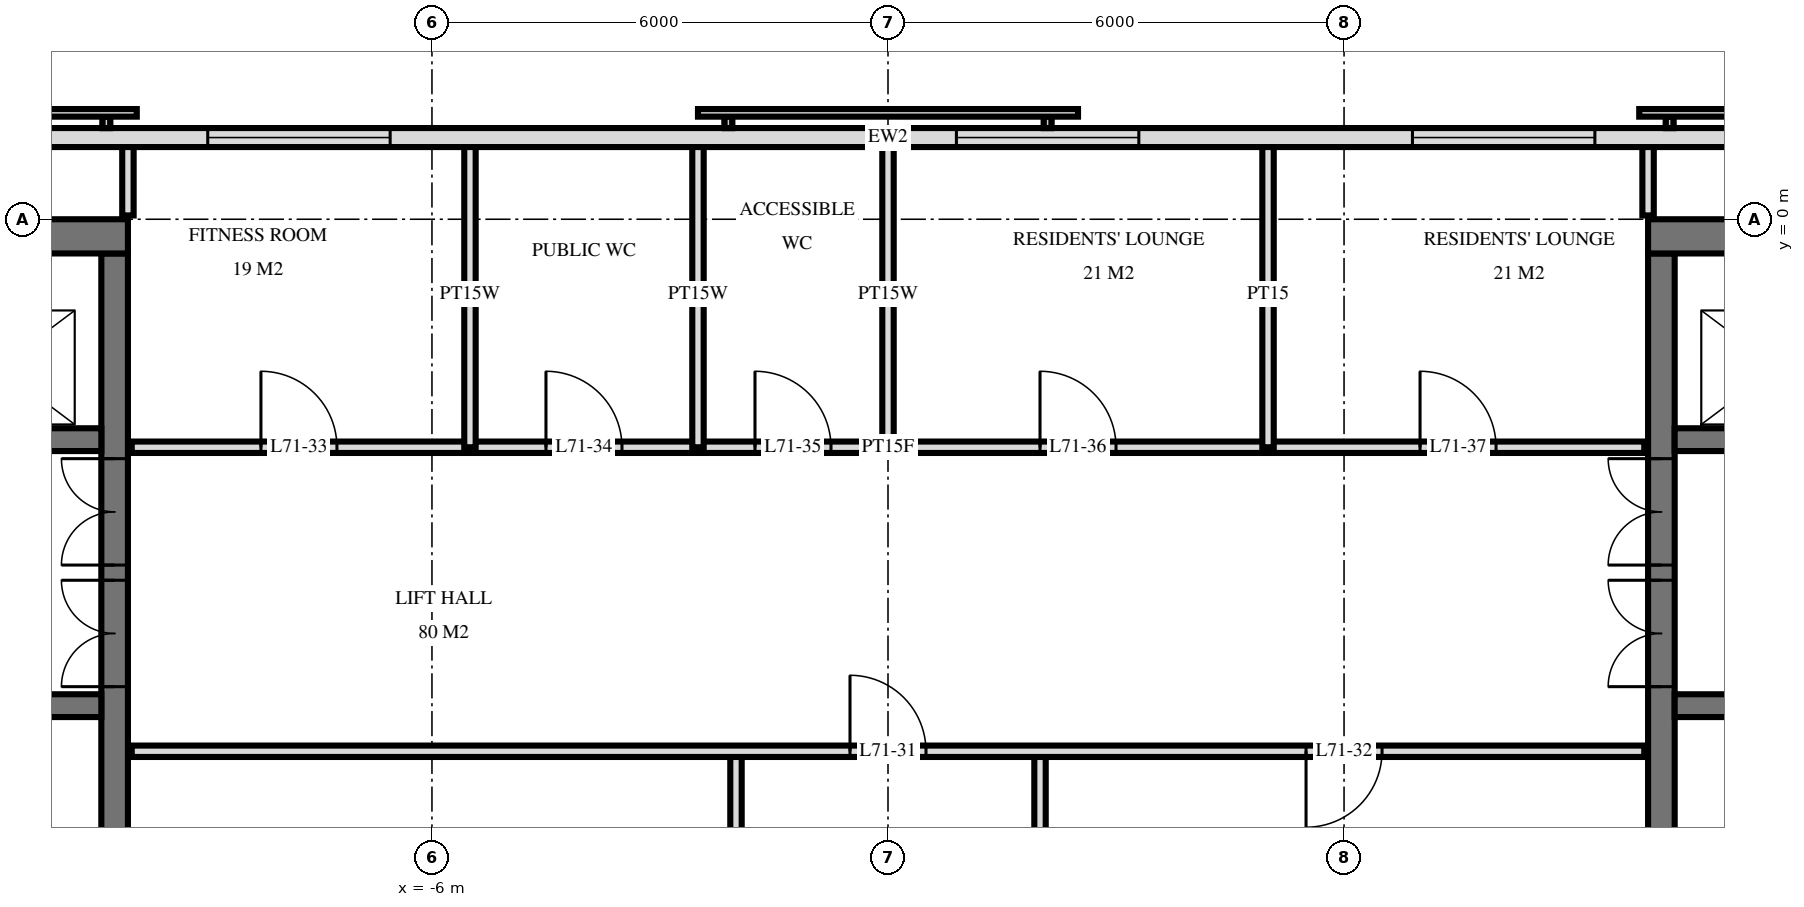
"""IFC4 building model, lengths in metres.
Left out: names, types, materials, properties, quantities, classifications, styles, units other than length and angle.
Written with IfcOpenShell. Run it as: python <this file> out.ifc"""

import sys

from ifc_helpers import new_model, si_unit, direction, frame, frame_2d, origin, place, context, subcontext, project, spatial, rectangle, extrude, element, fill, save


model = new_model("IFC4")
c1 = context("Model", 3, precision=1e-05, world=origin(), true_north=direction((0.0, 1.0)))
c2 = subcontext(c1, "Body", "Model", "MODEL_VIEW")
j1 = project(units=[si_unit("LENGTHUNIT", "METRE"), si_unit("PLANEANGLEUNIT", "RADIAN")], contexts=[c1])
p1 = place(None, origin())
s1 = spatial("IfcSite", under=j1, at=p1, CompositionType="ELEMENT")
p2 = place(p1, origin())
s2 = spatial("IfcBuilding", under=s1, at=p2, CompositionType="ELEMENT")
p3 = place(p2, frame((0.0, 0.0, 270.1)))
s3 = spatial("IfcBuildingStorey", under=s2, at=p3, CompositionType="ELEMENT", Elevation=270.1)
p4 = place(p3, frame((-19.5, -0.225, 0.0), z_axis=(0.0, 0.0, 1.0), x_axis=(1.0, 0.0, 0.0)))
e1 = element("IfcWall", 1, at=p4, inside=s3, PredefinedType="SHEAR", context=c2, shape_type="SweptSolid", body=[
    extrude(rectangle(XDim=9.5, YDim=0.45, at=frame_2d((4.75, 0.0))), origin(), (0.0, 0.0, 1.0), 3.5),
])
p5 = place(p3, frame((-10.175, -14.55, 0.0), z_axis=(0.0, 0.0, 1.0), x_axis=(0.0, 1.0, 0.0)))
e2 = element("IfcWall", 2, at=p5, inside=s3, PredefinedType="SHEAR", context=c2, shape_type="SweptSolid", body=[
    extrude(rectangle(XDim=14.1, YDim=0.35, at=frame_2d((7.05, 0.0))), origin(), (0.0, 0.0, 1.0), 3.5),
])
p6 = place(p5, frame((8.4, 0.0, 0.0)))
e3 = element("IfcOpeningElement", 3, at=p6, cuts=e2, PredefinedType="OPENING", context=c2, shape_type="SweptSolid", body=[
    extrude(rectangle(XDim=1.4, YDim=2.4, at=frame_2d((0.7, 1.2))), frame((0.0, 0.185, 0.0), z_axis=(0.0, -1.0, 0.0), x_axis=(1.0, 0.0, 0.0)), (0.0, 0.0, 1.0), 0.37),
])
p7 = place(p5, frame((10.0, 0.0, 0.0)))
e4 = element("IfcOpeningElement", 4, at=p7, cuts=e2, PredefinedType="OPENING", context=c2, shape_type="SweptSolid", body=[
    extrude(rectangle(XDim=1.4, YDim=2.4, at=frame_2d((0.7, 1.2))), frame((0.0, 0.185, 0.0), z_axis=(0.0, -1.0, 0.0), x_axis=(1.0, 0.0, 0.0)), (0.0, 0.0, 1.0), 0.37),
])
p8 = place(p5, frame((4.0, 0.0, 0.0)))
e5 = element("IfcOpeningElement", 5, at=p8, cuts=e2, PredefinedType="OPENING", context=c2, shape_type="SweptSolid", body=[
    extrude(rectangle(XDim=1.2, YDim=2.1, at=frame_2d((0.6, 1.05))), frame((0.0, 0.185, 0.0), z_axis=(0.0, -1.0, 0.0), x_axis=(1.0, 0.0, 0.0)), (0.0, 0.0, 1.0), 0.37),
])
p9 = place(p3, frame((-19.05, -2.9, 0.0), z_axis=(0.0, 0.0, 1.0), x_axis=(1.0, 0.0, 0.0)))
e6 = element("IfcWall", 6, at=p9, inside=s3, PredefinedType="SHEAR", context=c2, shape_type="SweptSolid", body=[
    extrude(rectangle(XDim=8.7, YDim=0.3, at=frame_2d((4.35, 0.0))), origin(), (0.0, 0.0, 1.0), 3.5),
])
p10 = place(p9, frame((6.8, 0.0, 0.0)))
e7 = element("IfcOpeningElement", 7, at=p10, cuts=e6, PredefinedType="OPENING", context=c2, shape_type="SweptSolid", body=[
    extrude(rectangle(XDim=1.1, YDim=2.1, at=frame_2d((0.55, 1.05))), frame((0.0, 0.16, 0.0), z_axis=(0.0, -1.0, 0.0), x_axis=(1.0, 0.0, 0.0)), (0.0, 0.0, 1.0), 0.32),
])
p11 = place(p9, frame((3.8, 0.0, 0.0)))
e8 = element("IfcOpeningElement", 8, at=p11, cuts=e6, PredefinedType="OPENING", context=c2, shape_type="SweptSolid", body=[
    extrude(rectangle(XDim=1.1, YDim=2.1, at=frame_2d((0.55, 1.05))), frame((0.0, 0.16, 0.0), z_axis=(0.0, -1.0, 0.0), x_axis=(1.0, 0.0, 0.0)), (0.0, 0.0, 1.0), 0.32),
])
p12 = place(p9, frame((0.9, 0.0, 0.0)))
e9 = element("IfcOpeningElement", 9, at=p12, cuts=e6, PredefinedType="OPENING", context=c2, shape_type="SweptSolid", body=[
    extrude(rectangle(XDim=0.9, YDim=2.1, at=frame_2d((0.45, 1.05))), frame((0.0, 0.16, 0.0), z_axis=(0.0, -1.0, 0.0), x_axis=(1.0, 0.0, 0.0)), (0.0, 0.0, 1.0), 0.32),
])
p13 = place(p3, frame((-19.05, -6.4, 0.0), z_axis=(0.0, 0.0, 1.0), x_axis=(1.0, 0.0, 0.0)))
e10 = element("IfcWall", 10, at=p13, inside=s3, PredefinedType="SHEAR", context=c2, shape_type="SweptSolid", body=[
    extrude(rectangle(XDim=8.7, YDim=0.3, at=frame_2d((4.35, 0.0))), origin(), (0.0, 0.0, 1.0), 3.5),
])
p14 = place(p13, frame((0.8, 0.0, 0.0)))
e11 = element("IfcOpeningElement", 11, at=p14, cuts=e10, PredefinedType="OPENING", context=c2, shape_type="SweptSolid", body=[
    extrude(rectangle(XDim=1.1, YDim=2.1, at=frame_2d((0.55, 1.05))), frame((0.0, 0.16, 0.0), z_axis=(0.0, -1.0, 0.0), x_axis=(1.0, 0.0, 0.0)), (0.0, 0.0, 1.0), 0.32),
])
p15 = place(p3, frame((10.0, -0.225, 0.0), z_axis=(0.0, 0.0, 1.0), x_axis=(1.0, 0.0, 0.0)))
e12 = element("IfcWall", 12, at=p15, inside=s3, PredefinedType="SHEAR", context=c2, shape_type="SweptSolid", body=[
    extrude(rectangle(XDim=9.5, YDim=0.45, at=frame_2d((4.75, 0.0))), origin(), (0.0, 0.0, 1.0), 3.5),
])
p16 = place(p3, frame((10.175, -14.55, 0.0), z_axis=(0.0, 0.0, 1.0), x_axis=(0.0, 1.0, 0.0)))
e13 = element("IfcWall", 13, at=p16, inside=s3, PredefinedType="SHEAR", context=c2, shape_type="SweptSolid", body=[
    extrude(rectangle(XDim=14.1, YDim=0.35, at=frame_2d((7.05, 0.0))), origin(), (0.0, 0.0, 1.0), 3.5),
])
p17 = place(p16, frame((8.4, 0.0, 0.0)))
e14 = element("IfcOpeningElement", 14, at=p17, cuts=e13, PredefinedType="OPENING", context=c2, shape_type="SweptSolid", body=[
    extrude(rectangle(XDim=1.4, YDim=2.4, at=frame_2d((0.7, 1.2))), frame((0.0, 0.185, 0.0), z_axis=(0.0, -1.0, 0.0), x_axis=(1.0, 0.0, 0.0)), (0.0, 0.0, 1.0), 0.37),
])
p18 = place(p16, frame((10.0, 0.0, 0.0)))
e15 = element("IfcOpeningElement", 15, at=p18, cuts=e13, PredefinedType="OPENING", context=c2, shape_type="SweptSolid", body=[
    extrude(rectangle(XDim=1.4, YDim=2.4, at=frame_2d((0.7, 1.2))), frame((0.0, 0.185, 0.0), z_axis=(0.0, -1.0, 0.0), x_axis=(1.0, 0.0, 0.0)), (0.0, 0.0, 1.0), 0.37),
])
p19 = place(p16, frame((4.0, 0.0, 0.0)))
e16 = element("IfcOpeningElement", 16, at=p19, cuts=e13, PredefinedType="OPENING", context=c2, shape_type="SweptSolid", body=[
    extrude(rectangle(XDim=1.2, YDim=2.1, at=frame_2d((0.6, 1.05))), frame((0.0, 0.185, 0.0), z_axis=(0.0, -1.0, 0.0), x_axis=(1.0, 0.0, 0.0)), (0.0, 0.0, 1.0), 0.37),
])
p20 = place(p3, frame((10.35, -2.9, 0.0), z_axis=(0.0, 0.0, 1.0), x_axis=(1.0, 0.0, 0.0)))
e17 = element("IfcWall", 17, at=p20, inside=s3, PredefinedType="SHEAR", context=c2, shape_type="SweptSolid", body=[
    extrude(rectangle(XDim=8.7, YDim=0.3, at=frame_2d((4.35, 0.0))), origin(), (0.0, 0.0, 1.0), 3.5),
])
p21 = place(p20, frame((0.8, 0.0, 0.0)))
e18 = element("IfcOpeningElement", 18, at=p21, cuts=e17, PredefinedType="OPENING", context=c2, shape_type="SweptSolid", body=[
    extrude(rectangle(XDim=1.1, YDim=2.1, at=frame_2d((0.55, 1.05))), frame((0.0, 0.16, 0.0), z_axis=(0.0, -1.0, 0.0), x_axis=(1.0, 0.0, 0.0)), (0.0, 0.0, 1.0), 0.32),
])
p22 = place(p20, frame((3.8, 0.0, 0.0)))
e19 = element("IfcOpeningElement", 19, at=p22, cuts=e17, PredefinedType="OPENING", context=c2, shape_type="SweptSolid", body=[
    extrude(rectangle(XDim=1.1, YDim=2.1, at=frame_2d((0.55, 1.05))), frame((0.0, 0.16, 0.0), z_axis=(0.0, -1.0, 0.0), x_axis=(1.0, 0.0, 0.0)), (0.0, 0.0, 1.0), 0.32),
])
p23 = place(p20, frame((6.9, 0.0, 0.0)))
e20 = element("IfcOpeningElement", 20, at=p23, cuts=e17, PredefinedType="OPENING", context=c2, shape_type="SweptSolid", body=[
    extrude(rectangle(XDim=0.9, YDim=2.1, at=frame_2d((0.45, 1.05))), frame((0.0, 0.16, 0.0), z_axis=(0.0, -1.0, 0.0), x_axis=(1.0, 0.0, 0.0)), (0.0, 0.0, 1.0), 0.32),
])
p24 = place(p3, frame((10.35, -6.4, 0.0), z_axis=(0.0, 0.0, 1.0), x_axis=(1.0, 0.0, 0.0)))
e21 = element("IfcWall", 21, at=p24, inside=s3, PredefinedType="SHEAR", context=c2, shape_type="SweptSolid", body=[
    extrude(rectangle(XDim=8.7, YDim=0.3, at=frame_2d((4.35, 0.0))), origin(), (0.0, 0.0, 1.0), 3.5),
])
p25 = place(p24, frame((6.8, 0.0, 0.0)))
e22 = element("IfcOpeningElement", 22, at=p25, cuts=e21, PredefinedType="OPENING", context=c2, shape_type="SweptSolid", body=[
    extrude(rectangle(XDim=1.1, YDim=2.1, at=frame_2d((0.55, 1.05))), frame((0.0, 0.16, 0.0), z_axis=(0.0, -1.0, 0.0), x_axis=(1.0, 0.0, 0.0)), (0.0, 0.0, 1.0), 0.32),
])
p26 = place(p3, frame((18.575, 1.075, 0.0), z_axis=(0.0, 0.0, 1.0), x_axis=(-1.0, 0.0, 0.0)))
e23 = element("IfcWall", 23, at=p26, inside=s3, PredefinedType="SOLIDWALL", context=c2, shape_type="SweptSolid", body=[
    extrude(rectangle(XDim=37.151, YDim=0.25, at=frame_2d((18.575, 0.0))), origin(), (0.0, 0.0, 1.0), 3.22),
])
p27 = place(p26, frame((9.275, 0.0, 0.9)))
e24 = element("IfcOpeningElement", 24, at=p27, cuts=e23, PredefinedType="OPENING", context=c2, shape_type="SweptSolid", body=[
    extrude(rectangle(XDim=2.4, YDim=1.5, at=frame_2d((1.2, 0.75))), frame((0.0, 0.135, 0.0), z_axis=(0.0, -1.0, 0.0), x_axis=(1.0, 0.0, 0.0)), (0.0, 0.0, 1.0), 0.27),
])
p28 = place(p26, frame((15.275, 0.0, 0.9)))
e25 = element("IfcOpeningElement", 25, at=p28, cuts=e23, PredefinedType="OPENING", context=c2, shape_type="SweptSolid", body=[
    extrude(rectangle(XDim=2.4, YDim=1.5, at=frame_2d((1.2, 0.75))), frame((0.0, 0.135, 0.0), z_axis=(0.0, -1.0, 0.0), x_axis=(1.0, 0.0, 0.0)), (0.0, 0.0, 1.0), 0.27),
])
p29 = place(p26, frame((25.125, 0.0, 0.9)))
e26 = element("IfcOpeningElement", 26, at=p29, cuts=e23, PredefinedType="OPENING", context=c2, shape_type="SweptSolid", body=[
    extrude(rectangle(XDim=2.4, YDim=1.5, at=frame_2d((1.2, 0.75))), frame((0.0, 0.135, 0.0), z_axis=(0.0, -1.0, 0.0), x_axis=(1.0, 0.0, 0.0)), (0.0, 0.0, 1.0), 0.27),
])
p30 = place(p3, frame((10.0, 0.05, 0.0), z_axis=(0.0, 0.0, 1.0), x_axis=(0.0, 1.0, 0.0)))
e27 = element("IfcWall", 27, at=p30, inside=s3, PredefinedType="PARTITIONING", context=c2, shape_type="SweptSolid", body=[
    extrude(rectangle(XDim=0.97, YDim=0.15, at=frame_2d((0.485, 0.0))), origin(), (0.0, 0.0, 1.0), 3.22),
])
p31 = place(p3, frame((5.0, -3.0, 0.0), z_axis=(0.0, 0.0, 1.0), x_axis=(0.0, 1.0, 0.0)))
e28 = element("IfcWall", 28, at=p31, inside=s3, PredefinedType="PARTITIONING", context=c2, shape_type="SweptSolid", body=[
    extrude(rectangle(XDim=4.02, YDim=0.15, at=frame_2d((2.01, 0.0))), origin(), (0.0, 0.0, 1.0), 3.22),
])
p32 = place(p3, frame((2.0, -11.0, 0.0), z_axis=(0.0, 0.0, 1.0), x_axis=(0.0, 1.0, 0.0)))
e29 = element("IfcWall", 29, at=p32, inside=s3, PredefinedType="PARTITIONING", context=c2, shape_type="SweptSolid", body=[
    extrude(rectangle(XDim=4.0, YDim=0.15, at=frame_2d((2.0, 0.0))), origin(), (0.0, 0.0, 1.0), 3.22),
])
p33 = place(p3, frame((0.0, -3.0, 0.0), z_axis=(0.0, 0.0, 1.0), x_axis=(0.0, 1.0, 0.0)))
e30 = element("IfcWall", 30, at=p33, inside=s3, PredefinedType="PLUMBINGWALL", context=c2, shape_type="SweptSolid", body=[
    extrude(rectangle(XDim=4.02, YDim=0.15, at=frame_2d((2.01, 0.0))), origin(), (0.0, 0.0, 1.0), 3.22),
])
p34 = place(p3, frame((-2.0, -11.0, 0.0), z_axis=(0.0, 0.0, 1.0), x_axis=(0.0, 1.0, 0.0)))
e31 = element("IfcWall", 31, at=p34, inside=s3, PredefinedType="PARTITIONING", context=c2, shape_type="SweptSolid", body=[
    extrude(rectangle(XDim=4.0, YDim=0.15, at=frame_2d((2.0, 0.0))), origin(), (0.0, 0.0, 1.0), 3.22),
])
for number, where, z_axis, x_axis in (
    (32, (-2.5, -3.0, 0.0), (0.0, 0.0, 1.0), (0.0, 1.0, 0.0)),
    (33, (-5.5, -3.0, 0.0), (0.0, 0.0, 1.0), (0.0, 1.0, 0.0)),
):
    element("IfcWall", number, at=place(p3, frame(where, z_axis=z_axis, x_axis=x_axis)), inside=s3, PredefinedType="PLUMBINGWALL", context=c2, shape_type="SweptSolid", body=[
        extrude(rectangle(XDim=4.02, YDim=0.15, at=frame_2d((2.01, 0.0))), origin(), (0.0, 0.0, 1.0), 3.22),
    ])
p35 = place(p3, frame((-10.0, 0.05, 0.0), z_axis=(0.0, 0.0, 1.0), x_axis=(0.0, 1.0, 0.0)))
e34 = element("IfcWall", 34, at=p35, inside=s3, PredefinedType="PARTITIONING", context=c2, shape_type="SweptSolid", body=[
    extrude(rectangle(XDim=0.97, YDim=0.15, at=frame_2d((0.485, 0.0))), origin(), (0.0, 0.0, 1.0), 3.22),
])
p36 = place(p3, frame((-9.95, -7.0, 0.0), z_axis=(0.0, 0.0, 1.0), x_axis=(1.0, 0.0, 0.0)))
e35 = element("IfcWall", 35, at=p36, inside=s3, PredefinedType="PARTITIONING", context=c2, shape_type="SweptSolid", body=[
    extrude(rectangle(XDim=19.9, YDim=0.15, at=frame_2d((9.95, 0.0))), origin(), (0.0, 0.0, 1.0), 3.22),
])
p37 = place(p36, frame((9.45, 0.0, 0.0)))
e36 = element("IfcOpeningElement", 36, at=p37, cuts=e35, PredefinedType="OPENING", context=c2, shape_type="SweptSolid", body=[
    extrude(rectangle(XDim=1.0, YDim=2.1, at=frame_2d((0.5, 1.05))), frame((0.0, 0.085, 0.0), z_axis=(0.0, -1.0, 0.0), x_axis=(1.0, 0.0, 0.0)), (0.0, 0.0, 1.0), 0.17),
])
p38 = place(p36, frame((15.45, 0.0, 0.0)))
e37 = element("IfcOpeningElement", 37, at=p38, cuts=e35, PredefinedType="OPENING", context=c2, shape_type="SweptSolid", body=[
    extrude(rectangle(XDim=1.0, YDim=2.1, at=frame_2d((0.5, 1.05))), frame((0.0, 0.085, 0.0), z_axis=(0.0, -1.0, 0.0), x_axis=(1.0, 0.0, 0.0)), (0.0, 0.0, 1.0), 0.17),
])
p39 = place(p3, frame((-9.95, -3.0, 0.0), z_axis=(0.0, 0.0, 1.0), x_axis=(1.0, 0.0, 0.0)))
e38 = element("IfcWall", 38, at=p39, inside=s3, PredefinedType="PARTITIONING", context=c2, shape_type="SweptSolid", body=[
    extrude(rectangle(XDim=19.9, YDim=0.15, at=frame_2d((9.95, 0.0))), origin(), (0.0, 0.0, 1.0), 3.22),
])
p40 = place(p39, frame((1.7, 0.0, 0.0)))
e39 = element("IfcOpeningElement", 39, at=p40, cuts=e38, PredefinedType="OPENING", context=c2, shape_type="SweptSolid", body=[
    extrude(rectangle(XDim=1.0, YDim=2.1, at=frame_2d((0.5, 1.05))), frame((0.0, 0.085, 0.0), z_axis=(0.0, -1.0, 0.0), x_axis=(1.0, 0.0, 0.0)), (0.0, 0.0, 1.0), 0.17),
])
p41 = place(p39, frame((5.45, 0.0, 0.0)))
e40 = element("IfcOpeningElement", 40, at=p41, cuts=e38, PredefinedType="OPENING", context=c2, shape_type="SweptSolid", body=[
    extrude(rectangle(XDim=1.0, YDim=2.1, at=frame_2d((0.5, 1.05))), frame((0.0, 0.085, 0.0), z_axis=(0.0, -1.0, 0.0), x_axis=(1.0, 0.0, 0.0)), (0.0, 0.0, 1.0), 0.17),
])
p42 = place(p39, frame((8.2, 0.0, 0.0)))
e41 = element("IfcOpeningElement", 41, at=p42, cuts=e38, PredefinedType="OPENING", context=c2, shape_type="SweptSolid", body=[
    extrude(rectangle(XDim=1.0, YDim=2.1, at=frame_2d((0.5, 1.05))), frame((0.0, 0.085, 0.0), z_axis=(0.0, -1.0, 0.0), x_axis=(1.0, 0.0, 0.0)), (0.0, 0.0, 1.0), 0.17),
])
p43 = place(p39, frame((11.95, 0.0, 0.0)))
e42 = element("IfcOpeningElement", 42, at=p43, cuts=e38, PredefinedType="OPENING", context=c2, shape_type="SweptSolid", body=[
    extrude(rectangle(XDim=1.0, YDim=2.1, at=frame_2d((0.5, 1.05))), frame((0.0, 0.085, 0.0), z_axis=(0.0, -1.0, 0.0), x_axis=(1.0, 0.0, 0.0)), (0.0, 0.0, 1.0), 0.17),
])
p44 = place(p39, frame((16.95, 0.0, 0.0)))
e43 = element("IfcOpeningElement", 43, at=p44, cuts=e38, PredefinedType="OPENING", context=c2, shape_type="SweptSolid", body=[
    extrude(rectangle(XDim=1.0, YDim=2.1, at=frame_2d((0.5, 1.05))), frame((0.0, 0.085, 0.0), z_axis=(0.0, -1.0, 0.0), x_axis=(1.0, 0.0, 0.0)), (0.0, 0.0, 1.0), 0.17),
])
p45 = place(p27, origin())
e44 = element("IfcWindow", 44, at=p45, inside=s3, PartitioningType="SINGLE_PANEL", PredefinedType="WINDOW", context=c2, shape_type="SweptSolid", body=[
    extrude(rectangle(XDim=2.4, YDim=1.5, at=frame_2d((1.2, 0.75))), frame((0.0, 0.03, 0.0), z_axis=(0.0, -1.0, 0.0), x_axis=(1.0, 0.0, 0.0)), (0.0, 0.0, 1.0), 0.06),
])
fill(e24, e44)
p46 = place(p28, origin())
e45 = element("IfcWindow", 45, at=p46, inside=s3, PartitioningType="SINGLE_PANEL", PredefinedType="WINDOW", context=c2, shape_type="SweptSolid", body=[
    extrude(rectangle(XDim=2.4, YDim=1.5, at=frame_2d((1.2, 0.75))), frame((0.0, 0.03, 0.0), z_axis=(0.0, -1.0, 0.0), x_axis=(1.0, 0.0, 0.0)), (0.0, 0.0, 1.0), 0.06),
])
fill(e25, e45)
p47 = place(p29, origin())
e46 = element("IfcWindow", 46, at=p47, inside=s3, PartitioningType="SINGLE_PANEL", PredefinedType="WINDOW", context=c2, shape_type="SweptSolid", body=[
    extrude(rectangle(XDim=2.4, YDim=1.5, at=frame_2d((1.2, 0.75))), frame((0.0, 0.03, 0.0), z_axis=(0.0, -1.0, 0.0), x_axis=(1.0, 0.0, 0.0)), (0.0, 0.0, 1.0), 0.06),
])
fill(e26, e46)
p48 = place(p6, origin())
e47 = element("IfcDoor", 47, at=p48, inside=s3, OperationType="DOUBLE_DOOR_SINGLE_SWING", PredefinedType="DOOR", context=c2, shape_type="SweptSolid", body=[
    extrude(rectangle(XDim=1.4, YDim=2.4, at=frame_2d((0.7, 1.2))), frame((0.0, 0.025, 0.0), z_axis=(0.0, -1.0, 0.0), x_axis=(1.0, 0.0, 0.0)), (0.0, 0.0, 1.0), 0.05),
])
fill(e3, e47)
p49 = place(p7, origin())
e48 = element("IfcDoor", 48, at=p49, inside=s3, OperationType="DOUBLE_DOOR_SINGLE_SWING", PredefinedType="DOOR", context=c2, shape_type="SweptSolid", body=[
    extrude(rectangle(XDim=1.4, YDim=2.4, at=frame_2d((0.7, 1.2))), frame((0.0, 0.025, 0.0), z_axis=(0.0, -1.0, 0.0), x_axis=(1.0, 0.0, 0.0)), (0.0, 0.0, 1.0), 0.05),
])
fill(e4, e48)
p50 = place(p17, origin())
e49 = element("IfcDoor", 49, at=p50, inside=s3, OperationType="DOUBLE_DOOR_SINGLE_SWING", PredefinedType="DOOR", context=c2, shape_type="SweptSolid", body=[
    extrude(rectangle(XDim=1.4, YDim=2.4, at=frame_2d((0.7, 1.2))), frame((0.0, 0.025, 0.0), z_axis=(0.0, -1.0, 0.0), x_axis=(1.0, 0.0, 0.0)), (0.0, 0.0, 1.0), 0.05),
])
fill(e14, e49)
p51 = place(p18, origin())
e50 = element("IfcDoor", 50, at=p51, inside=s3, OperationType="DOUBLE_DOOR_SINGLE_SWING", PredefinedType="DOOR", context=c2, shape_type="SweptSolid", body=[
    extrude(rectangle(XDim=1.4, YDim=2.4, at=frame_2d((0.7, 1.2))), frame((0.0, 0.025, 0.0), z_axis=(0.0, -1.0, 0.0), x_axis=(1.0, 0.0, 0.0)), (0.0, 0.0, 1.0), 0.05),
])
fill(e15, e50)
p52 = place(p37, origin())
e51 = element("IfcDoor", 51, at=p52, inside=s3, OperationType="SINGLE_SWING_RIGHT", PredefinedType="DOOR", context=c2, shape_type="SweptSolid", body=[
    extrude(rectangle(XDim=1.0, YDim=2.1, at=frame_2d((0.5, 1.05))), frame((0.0, 0.025, 0.0), z_axis=(0.0, -1.0, 0.0), x_axis=(1.0, 0.0, 0.0)), (0.0, 0.0, 1.0), 0.05),
])
fill(e36, e51)
p53 = place(p38, frame((0.5, 0.0, 0.0), z_axis=(0.0, 0.0, 1.0), x_axis=(-1.0, 0.0, 0.0)))
e52 = element("IfcDoor", 52, at=p53, inside=s3, OperationType="SINGLE_SWING_LEFT", PredefinedType="DOOR", context=c2, shape_type="SweptSolid", body=[
    extrude(rectangle(XDim=1.0, YDim=2.1, at=frame_2d((0.0, 1.05))), frame((0.0, -0.025, 0.0), z_axis=(0.0, 1.0, 0.0), x_axis=(-1.0, 0.0, 0.0)), (0.0, 0.0, 1.0), 0.05),
])
fill(e37, e52)
p54 = place(p40, origin())
e53 = element("IfcDoor", 53, at=p54, inside=s3, OperationType="SINGLE_SWING_RIGHT", PredefinedType="DOOR", context=c2, shape_type="SweptSolid", body=[
    extrude(rectangle(XDim=1.0, YDim=2.1, at=frame_2d((0.5, 1.05))), frame((0.0, 0.025, 0.0), z_axis=(0.0, -1.0, 0.0), x_axis=(1.0, 0.0, 0.0)), (0.0, 0.0, 1.0), 0.05),
])
fill(e39, e53)
p55 = place(p41, origin())
e54 = element("IfcDoor", 54, at=p55, inside=s3, OperationType="SINGLE_SWING_RIGHT", PredefinedType="DOOR", context=c2, shape_type="SweptSolid", body=[
    extrude(rectangle(XDim=1.0, YDim=2.1, at=frame_2d((0.5, 1.05))), frame((0.0, 0.025, 0.0), z_axis=(0.0, -1.0, 0.0), x_axis=(1.0, 0.0, 0.0)), (0.0, 0.0, 1.0), 0.05),
])
fill(e40, e54)
p56 = place(p42, origin())
e55 = element("IfcDoor", 55, at=p56, inside=s3, OperationType="SINGLE_SWING_RIGHT", PredefinedType="DOOR", context=c2, shape_type="SweptSolid", body=[
    extrude(rectangle(XDim=1.0, YDim=2.1, at=frame_2d((0.5, 1.05))), frame((0.0, 0.025, 0.0), z_axis=(0.0, -1.0, 0.0), x_axis=(1.0, 0.0, 0.0)), (0.0, 0.0, 1.0), 0.05),
])
fill(e41, e55)
p57 = place(p43, origin())
e56 = element("IfcDoor", 56, at=p57, inside=s3, OperationType="SINGLE_SWING_RIGHT", PredefinedType="DOOR", context=c2, shape_type="SweptSolid", body=[
    extrude(rectangle(XDim=1.0, YDim=2.1, at=frame_2d((0.5, 1.05))), frame((0.0, 0.025, 0.0), z_axis=(0.0, -1.0, 0.0), x_axis=(1.0, 0.0, 0.0)), (0.0, 0.0, 1.0), 0.05),
])
fill(e42, e56)
p58 = place(p44, origin())
e57 = element("IfcDoor", 57, at=p58, inside=s3, OperationType="SINGLE_SWING_RIGHT", PredefinedType="DOOR", context=c2, shape_type="SweptSolid", body=[
    extrude(rectangle(XDim=1.0, YDim=2.1, at=frame_2d((0.5, 1.05))), frame((0.0, 0.025, 0.0), z_axis=(0.0, -1.0, 0.0), x_axis=(1.0, 0.0, 0.0)), (0.0, 0.0, 1.0), 0.05),
])
fill(e43, e57)
save(model, sys.argv[1])
